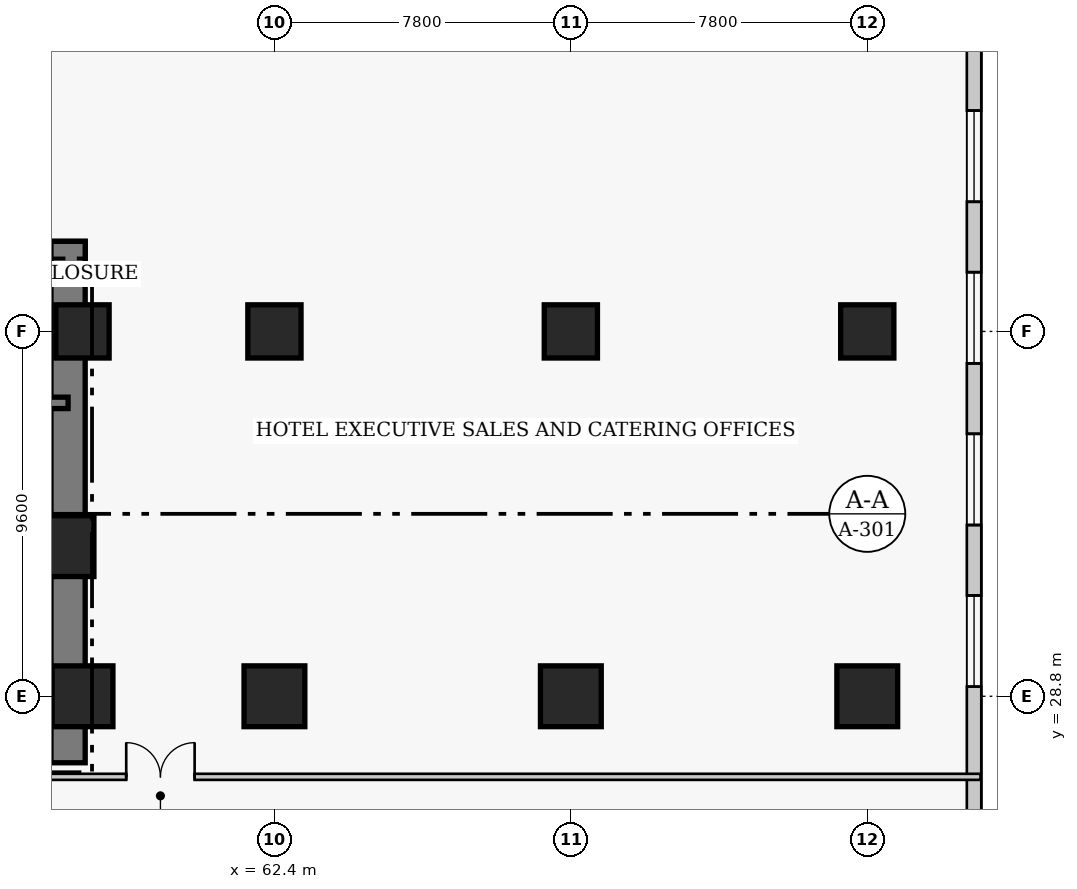
"""IFC4 building model, lengths in metres.
Left out: names, types, materials, properties, quantities, classifications, styles, units other than length and angle.
Written with IfcOpenShell. Run it as: python <this file> out.ifc"""

import sys

from ifc_helpers import new_model, si_unit, direction, frame, frame_2d, origin, origin_2d, place, context, subcontext, project, spatial, rectangle, extrude, element, fill, save


model = new_model("IFC4")
c1 = context("Model", 3, precision=1e-05, world=origin(), true_north=direction((0.0, 1.0)))
c2 = subcontext(c1, "Body", "Model", "MODEL_VIEW")
j1 = project(units=[si_unit("LENGTHUNIT", "METRE"), si_unit("PLANEANGLEUNIT", "RADIAN")], contexts=[c1])
p1 = place(None, origin())
s1 = spatial("IfcSite", under=j1, at=p1, CompositionType="ELEMENT")
p2 = place(p1, origin())
s2 = spatial("IfcBuilding", under=s1, at=p2, CompositionType="ELEMENT")
p3 = place(p2, frame((0.0, 0.0, 5.4)))
s3 = spatial("IfcBuildingStorey", under=s2, at=p3, CompositionType="ELEMENT", Elevation=5.4)
p4 = place(p3, frame((48.45, 40.32, 0.0), z_axis=(0.0, 0.0, 1.0), x_axis=(1.0, 0.0, 0.0)))
e1 = element("IfcWall", 1, at=p4, inside=s3, PredefinedType="SHEAR", context=c2, shape_type="SweptSolid", body=[
    extrude(rectangle(XDim=8.97, YDim=0.9, at=frame_2d((4.485, 0.0))), origin(), (0.0, 0.0, 1.0), 5.0),
])
p5 = place(p3, frame((56.97, 27.05, 0.0), z_axis=(0.0, 0.0, 1.0), x_axis=(0.0, 1.0, 0.0)))
e2 = element("IfcWall", 2, at=p5, inside=s3, PredefinedType="SHEAR", context=c2, shape_type="SweptSolid", body=[
    extrude(rectangle(XDim=13.72, YDim=0.9, at=frame_2d((6.86, 0.0))), origin(), (0.0, 0.0, 1.0), 5.0),
])
p6 = place(p3, frame((48.45, 36.52, 0.0), z_axis=(0.0, 0.0, 1.0), x_axis=(1.0, 0.0, 0.0)))
e3 = element("IfcWall", 3, at=p6, inside=s3, PredefinedType="SHEAR", context=c2, shape_type="SweptSolid", body=[
    extrude(rectangle(XDim=8.52, YDim=0.3, at=frame_2d((4.26, 0.0))), origin(), (0.0, 0.0, 1.0), 5.0),
])
p7 = place(p3, frame((62.4, 28.8, 0.0), z_axis=(0.0, 0.0, 1.0), x_axis=(1.0, 0.0, 0.0)))
e4 = element("IfcColumn", 4, at=p7, inside=s3, PredefinedType="COLUMN", context=c2, shape_type="SweptSolid", body=[
    extrude(rectangle(XDim=1.6, YDim=1.6, at=origin_2d()), origin(), (0.0, 0.0, 1.0), 5.0),
])
p8 = place(p3, frame((62.4, 38.4, 0.0), z_axis=(0.0, 0.0, 1.0), x_axis=(1.0, 0.0, 0.0)))
e5 = element("IfcColumn", 5, at=p8, inside=s3, PredefinedType="COLUMN", context=c2, shape_type="SweptSolid", body=[
    extrude(rectangle(XDim=1.4, YDim=1.4, at=origin_2d()), origin(), (0.0, 0.0, 1.0), 5.0),
])
p9 = place(p3, frame((70.2, 28.8, 0.0), z_axis=(0.0, 0.0, 1.0), x_axis=(1.0, 0.0, 0.0)))
e6 = element("IfcColumn", 6, at=p9, inside=s3, PredefinedType="COLUMN", context=c2, shape_type="SweptSolid", body=[
    extrude(rectangle(XDim=1.6, YDim=1.6, at=origin_2d()), origin(), (0.0, 0.0, 1.0), 5.0),
])
p10 = place(p3, frame((70.2, 38.4, 0.0), z_axis=(0.0, 0.0, 1.0), x_axis=(1.0, 0.0, 0.0)))
e7 = element("IfcColumn", 7, at=p10, inside=s3, PredefinedType="COLUMN", context=c2, shape_type="SweptSolid", body=[
    extrude(rectangle(XDim=1.4, YDim=1.4, at=origin_2d()), origin(), (0.0, 0.0, 1.0), 5.0),
])
p11 = place(p3, frame((78.0, 28.8, 0.0), z_axis=(0.0, 0.0, 1.0), x_axis=(1.0, 0.0, 0.0)))
e8 = element("IfcColumn", 8, at=p11, inside=s3, PredefinedType="COLUMN", context=c2, shape_type="SweptSolid", body=[
    extrude(rectangle(XDim=1.6, YDim=1.6, at=origin_2d()), origin(), (0.0, 0.0, 1.0), 5.0),
])
p12 = place(p3, frame((78.0, 38.4, 0.0), z_axis=(0.0, 0.0, 1.0), x_axis=(1.0, 0.0, 0.0)))
e9 = element("IfcColumn", 9, at=p12, inside=s3, PredefinedType="COLUMN", context=c2, shape_type="SweptSolid", body=[
    extrude(rectangle(XDim=1.4, YDim=1.4, at=origin_2d()), origin(), (0.0, 0.0, 1.0), 5.0),
])
p13 = place(p3, frame((57.35, 28.8, 0.0), z_axis=(0.0, 0.0, 1.0), x_axis=(1.0, 0.0, 0.0)))
e10 = element("IfcColumn", 10, at=p13, inside=s3, PredefinedType="COLUMN", context=c2, shape_type="SweptSolid", body=[
    extrude(rectangle(XDim=1.6, YDim=1.6, at=origin_2d()), origin(), (0.0, 0.0, 1.0), 5.0),
])
p14 = place(p3, frame((57.35, 38.4, 0.0), z_axis=(0.0, 0.0, 1.0), x_axis=(1.0, 0.0, 0.0)))
e11 = element("IfcColumn", 11, at=p14, inside=s3, PredefinedType="COLUMN", context=c2, shape_type="SweptSolid", body=[
    extrude(rectangle(XDim=1.4, YDim=1.4, at=origin_2d()), origin(), (0.0, 0.0, 1.0), 5.0),
])
p15 = place(p3, frame((56.85, 32.75, 0.0), z_axis=(0.0, 0.0, 1.0), x_axis=(1.0, 0.0, 0.0)))
e12 = element("IfcColumn", 12, at=p15, inside=s3, PredefinedType="COLUMN", context=c2, shape_type="SweptSolid", body=[
    extrude(rectangle(XDim=1.6, YDim=1.6, at=origin_2d()), origin(), (0.0, 0.0, 1.0), 5.0),
])
p16 = place(p3, frame((80.81, 2.61, 0.0), z_axis=(0.0, 0.0, 1.0), x_axis=(0.0, 1.0, 0.0)))
e13 = element("IfcWall", 13, at=p16, inside=s3, PredefinedType="SOLIDWALL", context=c2, shape_type="SweptSolid", body=[
    extrude(rectangle(XDim=46.78, YDim=0.38, at=frame_2d((23.39, 0.0))), origin(), (0.0, 0.0, 1.0), 4.65),
])
p17 = place(p16, frame((0.927, 0.0, 0.75)))
e14 = element("IfcOpeningElement", 14, at=p17, cuts=e13, PredefinedType="OPENING", context=c2, shape_type="SweptSolid", body=[
    extrude(rectangle(XDim=2.4, YDim=2.2, at=frame_2d((1.2, 1.1))), frame((0.0, 0.2, 0.0), z_axis=(0.0, -1.0, 0.0), x_axis=(1.0, 0.0, 0.0)), (0.0, 0.0, 1.0), 0.4),
])
p18 = place(p16, frame((5.179, 0.0, 0.75)))
e15 = element("IfcOpeningElement", 15, at=p18, cuts=e13, PredefinedType="OPENING", context=c2, shape_type="SweptSolid", body=[
    extrude(rectangle(XDim=2.4, YDim=2.2, at=frame_2d((1.2, 1.1))), frame((0.0, 0.2, 0.0), z_axis=(0.0, -1.0, 0.0), x_axis=(1.0, 0.0, 0.0)), (0.0, 0.0, 1.0), 0.4),
])
p19 = place(p16, frame((9.432, 0.0, 0.75)))
e16 = element("IfcOpeningElement", 16, at=p19, cuts=e13, PredefinedType="OPENING", context=c2, shape_type="SweptSolid", body=[
    extrude(rectangle(XDim=2.4, YDim=2.2, at=frame_2d((1.2, 1.1))), frame((0.0, 0.2, 0.0), z_axis=(0.0, -1.0, 0.0), x_axis=(1.0, 0.0, 0.0)), (0.0, 0.0, 1.0), 0.4),
])
p20 = place(p16, frame((13.034, 0.0, 0.75)))
e17 = element("IfcOpeningElement", 17, at=p20, cuts=e13, PredefinedType="OPENING", context=c2, shape_type="SweptSolid", body=[
    extrude(rectangle(XDim=2.4, YDim=2.2, at=frame_2d((1.2, 1.1))), frame((0.0, 0.2, 0.0), z_axis=(0.0, -1.0, 0.0), x_axis=(1.0, 0.0, 0.0)), (0.0, 0.0, 1.0), 0.4),
])
p21 = place(p16, frame((17.937, 0.0, 0.75)))
e18 = element("IfcOpeningElement", 18, at=p21, cuts=e13, PredefinedType="OPENING", context=c2, shape_type="SweptSolid", body=[
    extrude(rectangle(XDim=2.4, YDim=2.2, at=frame_2d((1.2, 1.1))), frame((0.0, 0.2, 0.0), z_axis=(0.0, -1.0, 0.0), x_axis=(1.0, 0.0, 0.0)), (0.0, 0.0, 1.0), 0.4),
])
p22 = place(p16, frame((26.443, 0.0, 0.75)))
e19 = element("IfcOpeningElement", 19, at=p22, cuts=e13, PredefinedType="OPENING", context=c2, shape_type="SweptSolid", body=[
    extrude(rectangle(XDim=2.4, YDim=2.2, at=frame_2d((1.2, 1.1))), frame((0.0, 0.2, 0.0), z_axis=(0.0, -1.0, 0.0), x_axis=(1.0, 0.0, 0.0)), (0.0, 0.0, 1.0), 0.4),
])
p23 = place(p16, frame((30.696, 0.0, 0.75)))
e20 = element("IfcOpeningElement", 20, at=p23, cuts=e13, PredefinedType="OPENING", context=c2, shape_type="SweptSolid", body=[
    extrude(rectangle(XDim=2.4, YDim=2.2, at=frame_2d((1.2, 1.1))), frame((0.0, 0.2, 0.0), z_axis=(0.0, -1.0, 0.0), x_axis=(1.0, 0.0, 0.0)), (0.0, 0.0, 1.0), 0.4),
])
p24 = place(p16, frame((34.948, 0.0, 0.75)))
e21 = element("IfcOpeningElement", 21, at=p24, cuts=e13, PredefinedType="OPENING", context=c2, shape_type="SweptSolid", body=[
    extrude(rectangle(XDim=2.4, YDim=2.2, at=frame_2d((1.2, 1.1))), frame((0.0, 0.2, 0.0), z_axis=(0.0, -1.0, 0.0), x_axis=(1.0, 0.0, 0.0)), (0.0, 0.0, 1.0), 0.4),
])
p25 = place(p16, frame((39.201, 0.0, 0.75)))
e22 = element("IfcOpeningElement", 22, at=p25, cuts=e13, PredefinedType="OPENING", context=c2, shape_type="SweptSolid", body=[
    extrude(rectangle(XDim=2.4, YDim=2.2, at=frame_2d((1.2, 1.1))), frame((0.0, 0.2, 0.0), z_axis=(0.0, -1.0, 0.0), x_axis=(1.0, 0.0, 0.0)), (0.0, 0.0, 1.0), 0.4),
])
p26 = place(p16, frame((43.454, 0.0, 0.75)))
e23 = element("IfcOpeningElement", 23, at=p26, cuts=e13, PredefinedType="OPENING", context=c2, shape_type="SweptSolid", body=[
    extrude(rectangle(XDim=2.4, YDim=2.2, at=frame_2d((1.2, 1.1))), frame((0.0, 0.2, 0.0), z_axis=(0.0, -1.0, 0.0), x_axis=(1.0, 0.0, 0.0)), (0.0, 0.0, 1.0), 0.4),
])
p27 = place(p3, frame((51.12, 29.5, 0.0), z_axis=(0.0, 0.0, 1.0), x_axis=(1.0, 0.0, 0.0)))
e24 = element("IfcWall", 24, at=p27, inside=s3, PredefinedType="PARTITIONING", context=c2, shape_type="SweptSolid", body=[
    extrude(rectangle(XDim=5.63, YDim=0.16, at=frame_2d((2.815, 0.0))), origin(), (0.0, 0.0, 1.0), 4.65),
])
p28 = place(p3, frame((-2.98, 26.68, 0.0), z_axis=(0.0, 0.0, 1.0), x_axis=(1.0, 0.0, 0.0)))
e25 = element("IfcWall", 25, at=p28, inside=s3, PredefinedType="PARTITIONING", context=c2, shape_type="SweptSolid", body=[
    extrude(rectangle(XDim=83.96, YDim=0.16, at=frame_2d((41.98, 0.0))), origin(), (0.0, 0.0, 1.0), 4.65),
])
p29 = place(p28, frame((41.08, 0.0, 0.0)))
e26 = element("IfcOpeningElement", 26, at=p29, cuts=e25, PredefinedType="OPENING", context=c2, shape_type="SweptSolid", body=[
    extrude(rectangle(XDim=1.8, YDim=2.2, at=frame_2d((0.9, 1.1))), frame((0.0, 0.09, 0.0), z_axis=(0.0, -1.0, 0.0), x_axis=(1.0, 0.0, 0.0)), (0.0, 0.0, 1.0), 0.18),
])
p30 = place(p28, frame((4.042, 0.0, 0.0)))
e27 = element("IfcOpeningElement", 27, at=p30, cuts=e25, PredefinedType="OPENING", context=c2, shape_type="SweptSolid", body=[
    extrude(rectangle(XDim=1.8, YDim=2.2, at=frame_2d((0.9, 1.1))), frame((0.0, 0.09, 0.0), z_axis=(0.0, -1.0, 0.0), x_axis=(1.0, 0.0, 0.0)), (0.0, 0.0, 1.0), 0.18),
])
p31 = place(p28, frame((61.48, 0.0, 0.0)))
e28 = element("IfcOpeningElement", 28, at=p31, cuts=e25, PredefinedType="OPENING", context=c2, shape_type="SweptSolid", body=[
    extrude(rectangle(XDim=1.8, YDim=2.2, at=frame_2d((0.9, 1.1))), frame((0.0, 0.09, 0.0), z_axis=(0.0, -1.0, 0.0), x_axis=(1.0, 0.0, 0.0)), (0.0, 0.0, 1.0), 0.18),
])
p32 = place(p22, origin())
e29 = element("IfcWindow", 29, at=p32, inside=s3, PartitioningType="SINGLE_PANEL", PredefinedType="WINDOW", context=c2, shape_type="SweptSolid", body=[
    extrude(rectangle(XDim=2.4, YDim=2.2, at=frame_2d((1.2, 1.1))), frame((0.0, 0.03, 0.0), z_axis=(0.0, -1.0, 0.0), x_axis=(1.0, 0.0, 0.0)), (0.0, 0.0, 1.0), 0.06),
])
fill(e19, e29)
p33 = place(p23, origin())
e30 = element("IfcWindow", 30, at=p33, inside=s3, PartitioningType="SINGLE_PANEL", PredefinedType="WINDOW", context=c2, shape_type="SweptSolid", body=[
    extrude(rectangle(XDim=2.4, YDim=2.2, at=frame_2d((1.2, 1.1))), frame((0.0, 0.03, 0.0), z_axis=(0.0, -1.0, 0.0), x_axis=(1.0, 0.0, 0.0)), (0.0, 0.0, 1.0), 0.06),
])
fill(e20, e30)
p34 = place(p24, origin())
e31 = element("IfcWindow", 31, at=p34, inside=s3, PartitioningType="SINGLE_PANEL", PredefinedType="WINDOW", context=c2, shape_type="SweptSolid", body=[
    extrude(rectangle(XDim=2.4, YDim=2.2, at=frame_2d((1.2, 1.1))), frame((0.0, 0.03, 0.0), z_axis=(0.0, -1.0, 0.0), x_axis=(1.0, 0.0, 0.0)), (0.0, 0.0, 1.0), 0.06),
])
fill(e21, e31)
p35 = place(p25, origin())
e32 = element("IfcWindow", 32, at=p35, inside=s3, PartitioningType="SINGLE_PANEL", PredefinedType="WINDOW", context=c2, shape_type="SweptSolid", body=[
    extrude(rectangle(XDim=2.4, YDim=2.2, at=frame_2d((1.2, 1.1))), frame((0.0, 0.03, 0.0), z_axis=(0.0, -1.0, 0.0), x_axis=(1.0, 0.0, 0.0)), (0.0, 0.0, 1.0), 0.06),
])
fill(e22, e32)
p36 = place(p31, origin())
e33 = element("IfcDoor", 33, at=p36, inside=s3, OperationType="DOUBLE_DOOR_SINGLE_SWING", PredefinedType="DOOR", context=c2, shape_type="SweptSolid", body=[
    extrude(rectangle(XDim=1.8, YDim=2.2, at=frame_2d((0.9, 1.1))), frame((0.0, 0.025, 0.0), z_axis=(0.0, -1.0, 0.0), x_axis=(1.0, 0.0, 0.0)), (0.0, 0.0, 1.0), 0.05),
])
fill(e28, e33)
save(model, sys.argv[1])
